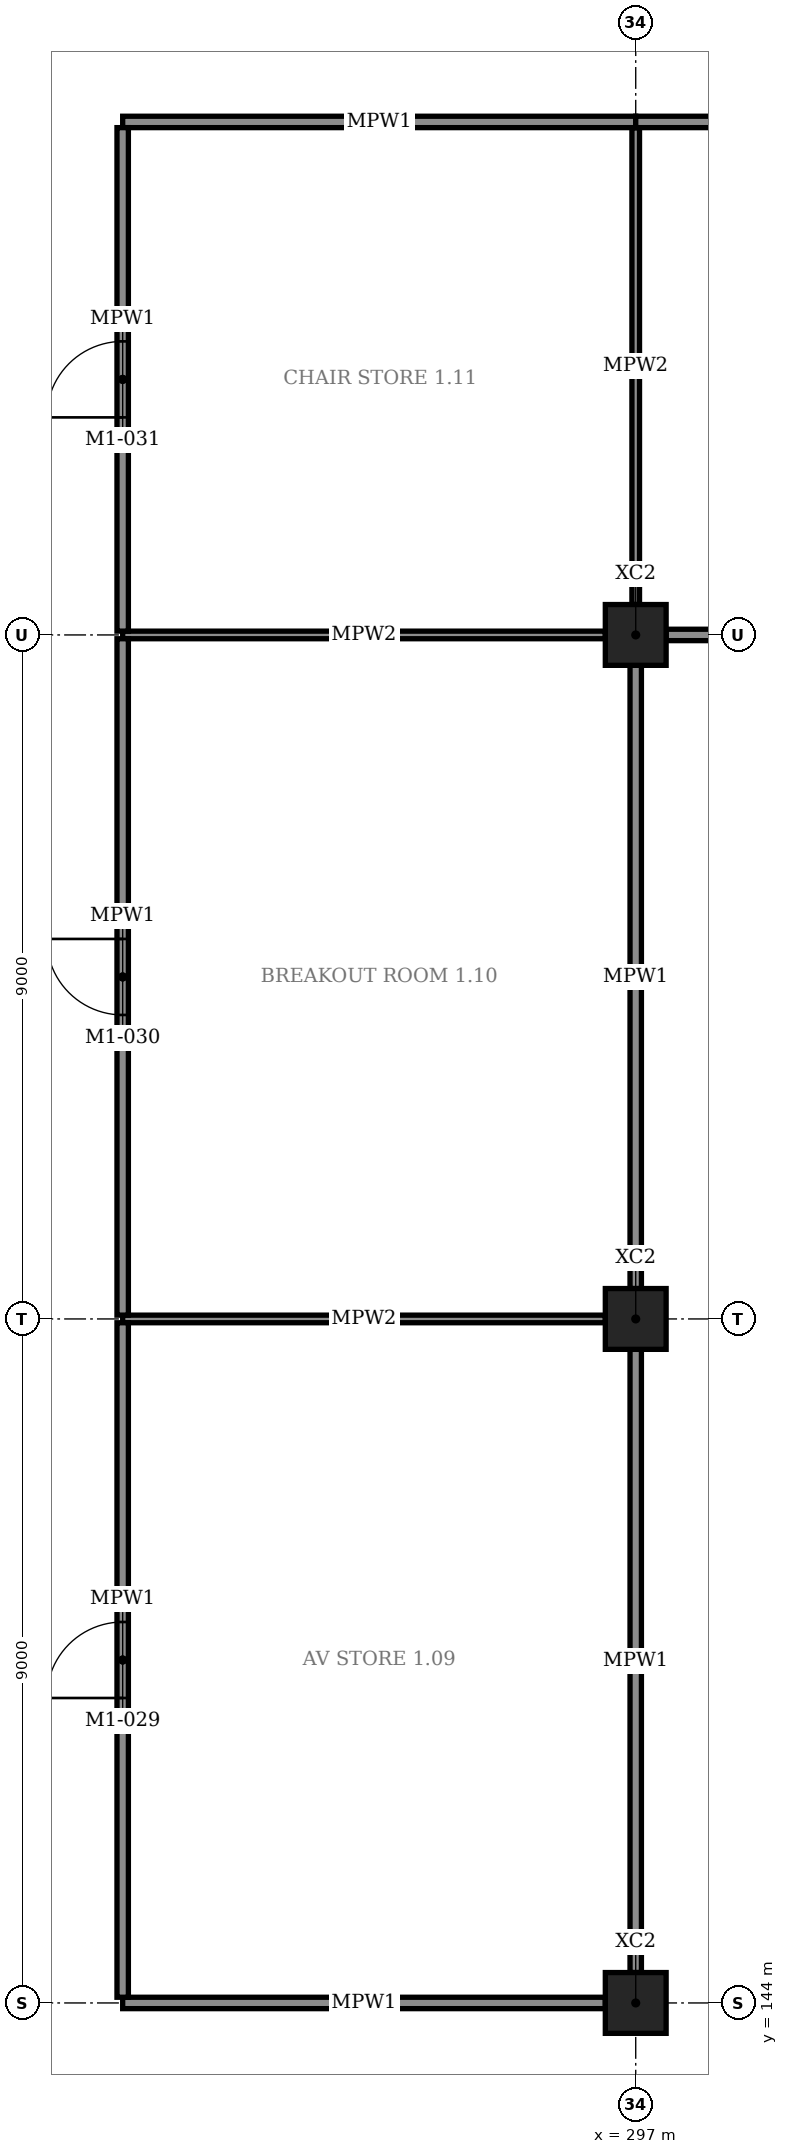
"""IFC4 building model, lengths in metres.
Left out: names, types, materials, properties, quantities, classifications, styles, units other than length and angle.
Written with IfcOpenShell. Run it as: python <this file> out.ifc"""

import sys

from ifc_helpers import new_model, si_unit, direction, frame, frame_2d, origin, origin_2d, place, context, subcontext, project, spatial, rectangle, extrude, element, fill, save


model = new_model("IFC4")
c1 = context("Model", 3, precision=1e-05, world=origin(), true_north=direction((0.0, 1.0)))
c2 = subcontext(c1, "Body", "Model", "MODEL_VIEW")
j1 = project(units=[si_unit("LENGTHUNIT", "METRE"), si_unit("PLANEANGLEUNIT", "RADIAN")], contexts=[c1])
p1 = place(None, origin())
s1 = spatial("IfcSite", under=j1, at=p1, CompositionType="ELEMENT")
p2 = place(p1, origin())
s2 = spatial("IfcBuilding", under=s1, at=p2, CompositionType="ELEMENT")
p3 = place(p2, frame((0.0, 0.0, 6.0)))
s3 = spatial("IfcBuildingStorey", under=s2, at=p3, CompositionType="ELEMENT", Elevation=6.0)
for number, where, z_axis, x_axis in (
    (1, (297.0, 144.0, 0.0), (0.0, 0.0, 1.0), (1.0, 0.0, 0.0)),
    (2, (297.0, 153.0, 0.0), (0.0, 0.0, 1.0), (1.0, 0.0, 0.0)),
    (3, (297.0, 162.0, 0.0), (0.0, 0.0, 1.0), (1.0, 0.0, 0.0)),
):
    element("IfcColumn", number, at=place(p3, frame(where, z_axis=z_axis, x_axis=x_axis)), inside=s3, PredefinedType="COLUMN", context=c2, shape_type="SweptSolid", body=[
        extrude(rectangle(XDim=0.8, YDim=0.8, at=origin_2d()), origin(), (0.0, 0.0, 1.0), 5.5),
    ])
p4 = place(p3, frame((290.25, 144.0, 0.0), z_axis=(0.0, 0.0, 1.0), x_axis=(1.0, 0.0, 0.0)))
e4 = element("IfcWall", 4, at=p4, inside=s3, PredefinedType="PARTITIONING", context=c2, shape_type="SweptSolid", body=[
    extrude(rectangle(XDim=6.35, YDim=0.15, at=frame_2d((3.175, 0.0))), origin(), (0.0, 0.0, 1.0), 4.32),
])
p5 = place(p3, frame((290.25, 153.0, 0.0), z_axis=(0.0, 0.0, 1.0), x_axis=(1.0, 0.0, 0.0)))
e5 = element("IfcWall", 5, at=p5, inside=s3, PredefinedType="PARTITIONING", context=c2, shape_type="SweptSolid", body=[
    extrude(rectangle(XDim=6.35, YDim=0.1, at=frame_2d((3.175, 0.0))), origin(), (0.0, 0.0, 1.0), 4.32),
])
p6 = place(p3, frame((290.25, 144.075, 0.0), z_axis=(0.0, 0.0, 1.0), x_axis=(0.0, 1.0, 0.0)))
e6 = element("IfcWall", 6, at=p6, inside=s3, PredefinedType="PARTITIONING", context=c2, shape_type="SweptSolid", body=[
    extrude(rectangle(XDim=8.875, YDim=0.15, at=frame_2d((4.438, 0.0))), origin(), (0.0, 0.0, 1.0), 4.32),
])
p7 = place(p6, frame((3.938, 0.0, 0.0)))
e7 = element("IfcOpeningElement", 7, at=p7, cuts=e6, PredefinedType="OPENING", context=c2, shape_type="SweptSolid", body=[
    extrude(rectangle(XDim=1.0, YDim=2.4, at=frame_2d((0.5, 1.2))), frame((0.0, 0.085, 0.0), z_axis=(0.0, -1.0, 0.0), x_axis=(1.0, 0.0, 0.0)), (0.0, 0.0, 1.0), 0.17),
])
p8 = place(p3, frame((297.0, 144.4, 0.0), z_axis=(0.0, 0.0, 1.0), x_axis=(0.0, 1.0, 0.0)))
e8 = element("IfcWall", 8, at=p8, inside=s3, PredefinedType="PARTITIONING", context=c2, shape_type="SweptSolid", body=[
    extrude(rectangle(XDim=8.2, YDim=0.15, at=frame_2d((4.1, 0.0))), origin(), (0.0, 0.0, 1.0), 4.32),
])
p9 = place(p3, frame((290.25, 162.0, 0.0), z_axis=(0.0, 0.0, 1.0), x_axis=(1.0, 0.0, 0.0)))
e9 = element("IfcWall", 9, at=p9, inside=s3, PredefinedType="PARTITIONING", context=c2, shape_type="SweptSolid", body=[
    extrude(rectangle(XDim=6.35, YDim=0.1, at=frame_2d((3.175, 0.0))), origin(), (0.0, 0.0, 1.0), 4.32),
])
p10 = place(p3, frame((290.25, 153.05, 0.0), z_axis=(0.0, 0.0, 1.0), x_axis=(0.0, 1.0, 0.0)))
e10 = element("IfcWall", 10, at=p10, inside=s3, PredefinedType="PARTITIONING", context=c2, shape_type="SweptSolid", body=[
    extrude(rectangle(XDim=8.9, YDim=0.15, at=frame_2d((4.45, 0.0))), origin(), (0.0, 0.0, 1.0), 4.32),
])
p11 = place(p10, frame((3.95, 0.0, 0.0)))
e11 = element("IfcOpeningElement", 11, at=p11, cuts=e10, PredefinedType="OPENING", context=c2, shape_type="SweptSolid", body=[
    extrude(rectangle(XDim=1.0, YDim=2.4, at=frame_2d((0.5, 1.2))), frame((0.0, 0.085, 0.0), z_axis=(0.0, -1.0, 0.0), x_axis=(1.0, 0.0, 0.0)), (0.0, 0.0, 1.0), 0.17),
])
p12 = place(p3, frame((297.0, 153.4, 0.0), z_axis=(0.0, 0.0, 1.0), x_axis=(0.0, 1.0, 0.0)))
e12 = element("IfcWall", 12, at=p12, inside=s3, PredefinedType="PARTITIONING", context=c2, shape_type="SweptSolid", body=[
    extrude(rectangle(XDim=8.2, YDim=0.15, at=frame_2d((4.1, 0.0))), origin(), (0.0, 0.0, 1.0), 4.32),
])
p13 = place(p3, frame((290.25, 168.75, 0.0), z_axis=(0.0, 0.0, 1.0), x_axis=(1.0, 0.0, 0.0)))
e13 = element("IfcWall", 13, at=p13, inside=s3, PredefinedType="PARTITIONING", context=c2, shape_type="SweptSolid", body=[
    extrude(rectangle(XDim=6.75, YDim=0.15, at=frame_2d((3.375, 0.0))), origin(), (0.0, 0.0, 1.0), 4.32),
])
p14 = place(p3, frame((290.25, 162.05, 0.0), z_axis=(0.0, 0.0, 1.0), x_axis=(0.0, 1.0, 0.0)))
e14 = element("IfcWall", 14, at=p14, inside=s3, PredefinedType="PARTITIONING", context=c2, shape_type="SweptSolid", body=[
    extrude(rectangle(XDim=6.625, YDim=0.15, at=frame_2d((3.312, 0.0))), origin(), (0.0, 0.0, 1.0), 4.32),
])
p15 = place(p14, frame((2.812, 0.0, 0.0)))
e15 = element("IfcOpeningElement", 15, at=p15, cuts=e14, PredefinedType="OPENING", context=c2, shape_type="SweptSolid", body=[
    extrude(rectangle(XDim=1.0, YDim=2.4, at=frame_2d((0.5, 1.2))), frame((0.0, 0.085, 0.0), z_axis=(0.0, -1.0, 0.0), x_axis=(1.0, 0.0, 0.0)), (0.0, 0.0, 1.0), 0.17),
])
p16 = place(p3, frame((297.0, 162.4, 0.0), z_axis=(0.0, 0.0, 1.0), x_axis=(0.0, 1.0, 0.0)))
e16 = element("IfcWall", 16, at=p16, inside=s3, PredefinedType="PARTITIONING", context=c2, shape_type="SweptSolid", body=[
    extrude(rectangle(XDim=6.275, YDim=0.1, at=frame_2d((3.138, 0.0))), origin(), (0.0, 0.0, 1.0), 4.32),
])
p17 = place(p3, frame((297.4, 162.0, 0.0), z_axis=(0.0, 0.0, 1.0), x_axis=(1.0, 0.0, 0.0)))
e17 = element("IfcWall", 17, at=p17, inside=s3, PredefinedType="PARTITIONING", context=c2, shape_type="SweptSolid", body=[
    extrude(rectangle(XDim=8.2, YDim=0.15, at=frame_2d((4.1, 0.0))), origin(), (0.0, 0.0, 1.0), 4.32),
])
p18 = place(p17, frame((3.6, 0.0, 0.0)))
e18 = element("IfcOpeningElement", 18, at=p18, cuts=e17, PredefinedType="OPENING", context=c2, shape_type="SweptSolid", body=[
    extrude(rectangle(XDim=1.0, YDim=2.4, at=frame_2d((0.5, 1.2))), frame((0.0, 0.085, 0.0), z_axis=(0.0, -1.0, 0.0), x_axis=(1.0, 0.0, 0.0)), (0.0, 0.0, 1.0), 0.17),
])
p19 = place(p3, frame((297.0, 168.75, 0.0), z_axis=(0.0, 0.0, 1.0), x_axis=(1.0, 0.0, 0.0)))
e19 = element("IfcWall", 19, at=p19, inside=s3, PredefinedType="PARTITIONING", context=c2, shape_type="SweptSolid", body=[
    extrude(rectangle(XDim=9.0, YDim=0.15, at=frame_2d((4.5, 0.0))), origin(), (0.0, 0.0, 1.0), 4.32),
])
p20 = place(p7, origin())
e20 = element("IfcDoor", 20, at=p20, inside=s3, OperationType="SINGLE_SWING_LEFT", PredefinedType="DOOR", context=c2, shape_type="SweptSolid", body=[
    extrude(rectangle(XDim=1.0, YDim=2.4, at=frame_2d((0.5, 1.2))), frame((0.0, 0.025, 0.0), z_axis=(0.0, -1.0, 0.0), x_axis=(1.0, 0.0, 0.0)), (0.0, 0.0, 1.0), 0.05),
])
fill(e7, e20)
p21 = place(p11, origin())
e21 = element("IfcDoor", 21, at=p21, inside=s3, OperationType="SINGLE_SWING_RIGHT", PredefinedType="DOOR", context=c2, shape_type="SweptSolid", body=[
    extrude(rectangle(XDim=1.0, YDim=2.4, at=frame_2d((0.5, 1.2))), frame((0.0, 0.025, 0.0), z_axis=(0.0, -1.0, 0.0), x_axis=(1.0, 0.0, 0.0)), (0.0, 0.0, 1.0), 0.05),
])
fill(e11, e21)
p22 = place(p15, origin())
e22 = element("IfcDoor", 22, at=p22, inside=s3, OperationType="SINGLE_SWING_LEFT", PredefinedType="DOOR", context=c2, shape_type="SweptSolid", body=[
    extrude(rectangle(XDim=1.0, YDim=2.4, at=frame_2d((0.5, 1.2))), frame((0.0, 0.025, 0.0), z_axis=(0.0, -1.0, 0.0), x_axis=(1.0, 0.0, 0.0)), (0.0, 0.0, 1.0), 0.05),
])
fill(e15, e22)
save(model, sys.argv[1])
